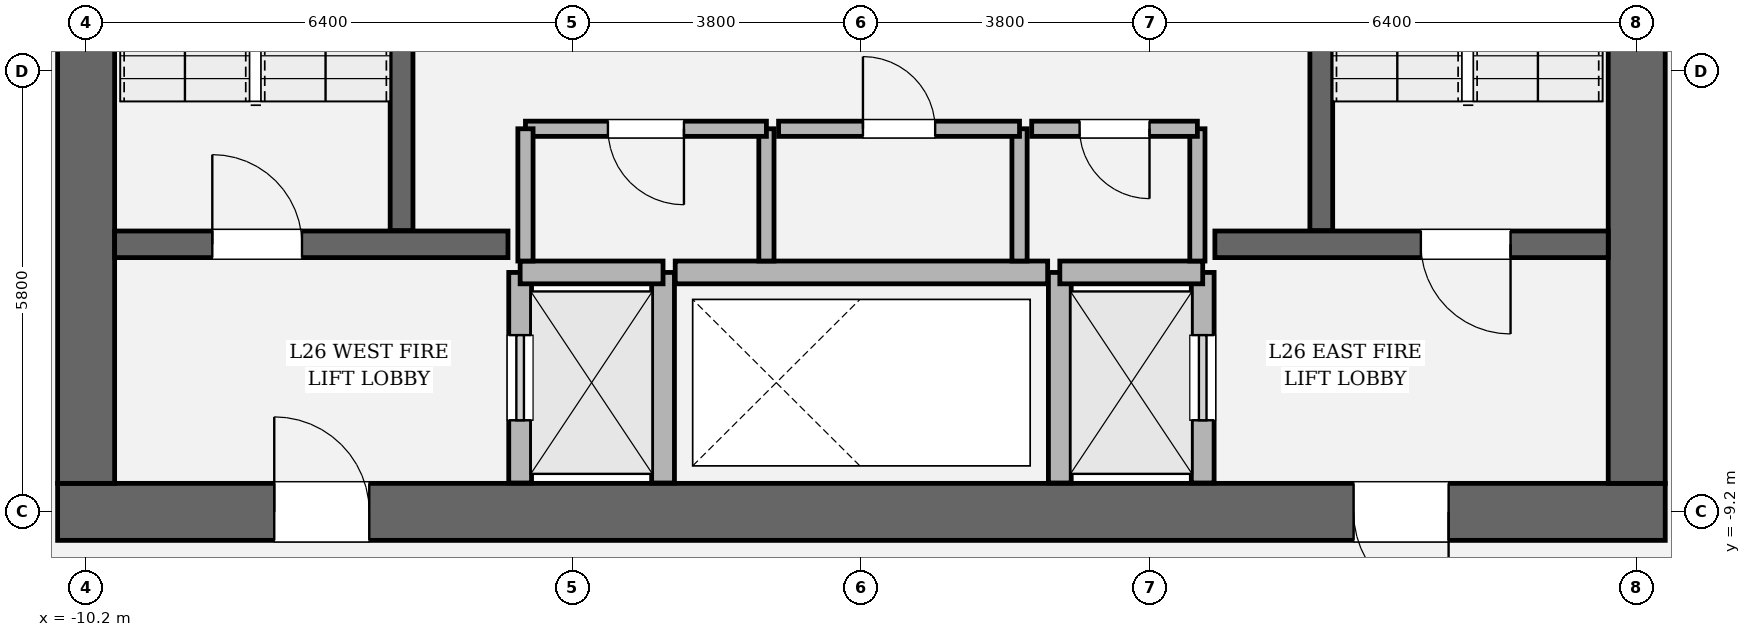
"""IFC4 building model, lengths in metres.
Left out: names, types, materials, properties, quantities, classifications, styles, units other than length and angle.
Written with IfcOpenShell. Run it as: python <this file> out.ifc"""

import sys

from ifc_helpers import new_model, si_unit, direction, frame, frame_2d, origin, place, context, subcontext, project, spatial, rectangle, extrude, element, fill, save


model = new_model("IFC4")
c1 = context("Model", 3, precision=1e-05, world=origin(), true_north=direction((0.0, 1.0)))
c2 = subcontext(c1, "Body", "Model", "MODEL_VIEW")
j1 = project(units=[si_unit("LENGTHUNIT", "METRE"), si_unit("PLANEANGLEUNIT", "RADIAN")], contexts=[c1])
p1 = place(None, origin())
s1 = spatial("IfcSite", under=j1, at=p1, CompositionType="ELEMENT")
p2 = place(p1, origin())
s2 = spatial("IfcBuilding", under=s1, at=p2, CompositionType="ELEMENT")
p3 = place(p2, frame((0.0, 0.0, 113.25)))
s3 = spatial("IfcBuildingStorey", under=s2, at=p3, CompositionType="ELEMENT", Elevation=113.25)
p4 = place(p3, frame((10.575, -9.2, 0.0), z_axis=(0.0, 0.0, 1.0), x_axis=(-1.0, 0.0, 0.0)))
e1 = element("IfcWall", 1, at=p4, inside=s3, PredefinedType="SHEAR", context=c2, shape_type="SweptSolid", body=[
    extrude(rectangle(XDim=21.15, YDim=0.75, at=frame_2d((10.575, 0.0))), origin(), (0.0, 0.0, 1.0), 4.05),
])
p5 = place(p4, frame((2.85, 0.0, 0.0)))
e2 = element("IfcOpeningElement", 2, at=p5, cuts=e1, PredefinedType="OPENING", context=c2, shape_type="SweptSolid", body=[
    extrude(rectangle(XDim=1.25, YDim=2.25, at=frame_2d((0.625, 1.125))), frame((0.0, 0.385, 0.0), z_axis=(0.0, -1.0, 0.0), x_axis=(1.0, 0.0, 0.0)), (0.0, 0.0, 1.0), 0.77),
])
p6 = place(p4, frame((17.05, 0.0, 0.0)))
e3 = element("IfcOpeningElement", 3, at=p6, cuts=e1, PredefinedType="OPENING", context=c2, shape_type="SweptSolid", body=[
    extrude(rectangle(XDim=1.25, YDim=2.25, at=frame_2d((0.625, 1.125))), frame((0.0, 0.385, 0.0), z_axis=(0.0, -1.0, 0.0), x_axis=(1.0, 0.0, 0.0)), (0.0, 0.0, 1.0), 0.77),
])
p7 = place(p3, frame((-10.2, -8.825, 0.0), z_axis=(0.0, 0.0, 1.0), x_axis=(0.0, 1.0, 0.0)))
e4 = element("IfcWall", 4, at=p7, inside=s3, PredefinedType="SHEAR", context=c2, shape_type="SweptSolid", body=[
    extrude(rectangle(XDim=17.65, YDim=0.75, at=frame_2d((8.825, 0.0))), origin(), (0.0, 0.0, 1.0), 4.05),
])
p8 = place(p7, frame((12.615, 0.0, 0.0)))
e5 = element("IfcOpeningElement", 5, at=p8, cuts=e4, PredefinedType="OPENING", context=c2, shape_type="SweptSolid", body=[
    extrude(rectangle(XDim=1.18, YDim=2.2, at=frame_2d((0.59, 1.1))), frame((0.0, 0.385, 0.0), z_axis=(0.0, -1.0, 0.0), x_axis=(1.0, 0.0, 0.0)), (0.0, 0.0, 1.0), 0.77),
])
p9 = place(p3, frame((10.2, 8.825, 0.0), z_axis=(0.0, 0.0, 1.0), x_axis=(0.0, -1.0, 0.0)))
e6 = element("IfcWall", 6, at=p9, inside=s3, PredefinedType="SHEAR", context=c2, shape_type="SweptSolid", body=[
    extrude(rectangle(XDim=17.65, YDim=0.75, at=frame_2d((8.825, 0.0))), origin(), (0.0, 0.0, 1.0), 4.05),
])
p10 = place(p9, frame((3.855, 0.0, 0.0)))
e7 = element("IfcOpeningElement", 7, at=p10, cuts=e6, PredefinedType="OPENING", context=c2, shape_type="SweptSolid", body=[
    extrude(rectangle(XDim=1.18, YDim=2.2, at=frame_2d((0.59, 1.1))), frame((0.0, 0.385, 0.0), z_axis=(0.0, -1.0, 0.0), x_axis=(1.0, 0.0, 0.0)), (0.0, 0.0, 1.0), 0.77),
])
for number, where, z_axis, x_axis in (
    (8, (-6.05, -5.5, 0.0), (0.0, 0.0, 1.0), (0.0, 1.0, 0.0)),
    (9, (6.05, 3.45, 0.0), (0.0, 0.0, 1.0), (0.0, -1.0, 0.0)),
):
    element("IfcWall", number, at=place(p3, frame(where, z_axis=z_axis, x_axis=x_axis)), inside=s3, PredefinedType="SOLIDWALL", context=c2, shape_type="SweptSolid", body=[
        extrude(rectangle(XDim=8.95, YDim=0.3, at=frame_2d((4.475, 0.0))), origin(), (0.0, 0.0, 1.0), 4.05),
    ])
p11 = place(p3, frame((-9.825, -5.68, 0.0), z_axis=(0.0, 0.0, 1.0), x_axis=(1.0, 0.0, 0.0)))
e10 = element("IfcWall", 10, at=p11, inside=s3, PredefinedType="SOLIDWALL", context=c2, shape_type="SweptSolid", body=[
    extrude(rectangle(XDim=5.175, YDim=0.35, at=frame_2d((2.587, 0.0))), origin(), (0.0, 0.0, 1.0), 4.05),
])
p12 = place(p11, frame((1.285, 0.0, 0.0)))
e11 = element("IfcOpeningElement", 11, at=p12, cuts=e10, PredefinedType="OPENING", context=c2, shape_type="SweptSolid", body=[
    extrude(rectangle(XDim=1.18, YDim=2.2, at=frame_2d((0.59, 1.1))), frame((0.0, 0.185, 0.0), z_axis=(0.0, -1.0, 0.0), x_axis=(1.0, 0.0, 0.0)), (0.0, 0.0, 1.0), 0.37),
])
p13 = place(p3, frame((4.65, -5.68, 0.0), z_axis=(0.0, 0.0, 1.0), x_axis=(1.0, 0.0, 0.0)))
e12 = element("IfcWall", 12, at=p13, inside=s3, PredefinedType="SOLIDWALL", context=c2, shape_type="SweptSolid", body=[
    extrude(rectangle(XDim=5.175, YDim=0.35, at=frame_2d((2.587, 0.0))), origin(), (0.0, 0.0, 1.0), 4.05),
])
p14 = place(p13, frame((2.71, 0.0, 0.0)))
e13 = element("IfcOpeningElement", 13, at=p14, cuts=e12, PredefinedType="OPENING", context=c2, shape_type="SweptSolid", body=[
    extrude(rectangle(XDim=1.18, YDim=2.2, at=frame_2d((0.59, 1.1))), frame((0.0, 0.185, 0.0), z_axis=(0.0, -1.0, 0.0), x_axis=(1.0, 0.0, 0.0)), (0.0, 0.0, 1.0), 0.37),
])
p15 = place(p3, frame((-4.49, -8.82, 0.0), z_axis=(0.0, 0.0, 1.0), x_axis=(0.0, 1.0, 0.0)))
e14 = element("IfcWall", 14, at=p15, inside=s3, PredefinedType="SOLIDWALL", context=c2, shape_type="SweptSolid", body=[
    extrude(rectangle(XDim=2.77, YDim=0.3, at=frame_2d((1.385, 0.0))), origin(), (0.0, 0.0, 1.0), 3.81),
])
p16 = place(p15, frame((0.825, 0.0, 0.0)))
e15 = element("IfcOpeningElement", 15, at=p16, cuts=e14, PredefinedType="OPENING", context=c2, shape_type="SweptSolid", body=[
    extrude(rectangle(XDim=1.12, YDim=2.25, at=frame_2d((0.56, 1.125))), frame((0.0, 0.16, 0.0), z_axis=(0.0, -1.0, 0.0), x_axis=(1.0, 0.0, 0.0)), (0.0, 0.0, 1.0), 0.32),
])
p17 = place(p3, frame((-2.61, -8.82, 0.0), z_axis=(0.0, 0.0, 1.0), x_axis=(0.0, 1.0, 0.0)))
e16 = element("IfcWall", 16, at=p17, inside=s3, PredefinedType="SOLIDWALL", context=c2, shape_type="SweptSolid", body=[
    extrude(rectangle(XDim=2.77, YDim=0.3, at=frame_2d((1.385, 0.0))), origin(), (0.0, 0.0, 1.0), 3.81),
])
p18 = place(p3, frame((-4.49, -6.05, 0.0), z_axis=(0.0, 0.0, 1.0), x_axis=(1.0, 0.0, 0.0)))
e17 = element("IfcWall", 17, at=p18, inside=s3, PredefinedType="SOLIDWALL", context=c2, shape_type="SweptSolid", body=[
    extrude(rectangle(XDim=1.88, YDim=0.3, at=frame_2d((0.94, 0.0))), origin(), (0.0, 0.0, 1.0), 3.81),
])
p19 = place(p3, frame((4.49, -8.82, 0.0), z_axis=(0.0, 0.0, 1.0), x_axis=(0.0, 1.0, 0.0)))
e18 = element("IfcWall", 18, at=p19, inside=s3, PredefinedType="SOLIDWALL", context=c2, shape_type="SweptSolid", body=[
    extrude(rectangle(XDim=2.77, YDim=0.3, at=frame_2d((1.385, 0.0))), origin(), (0.0, 0.0, 1.0), 3.81),
])
p20 = place(p19, frame((0.825, 0.0, 0.0)))
e19 = element("IfcOpeningElement", 19, at=p20, cuts=e18, PredefinedType="OPENING", context=c2, shape_type="SweptSolid", body=[
    extrude(rectangle(XDim=1.12, YDim=2.25, at=frame_2d((0.56, 1.125))), frame((0.0, 0.16, 0.0), z_axis=(0.0, -1.0, 0.0), x_axis=(1.0, 0.0, 0.0)), (0.0, 0.0, 1.0), 0.32),
])
p21 = place(p3, frame((2.61, -8.82, 0.0), z_axis=(0.0, 0.0, 1.0), x_axis=(0.0, 1.0, 0.0)))
e20 = element("IfcWall", 20, at=p21, inside=s3, PredefinedType="SOLIDWALL", context=c2, shape_type="SweptSolid", body=[
    extrude(rectangle(XDim=2.77, YDim=0.3, at=frame_2d((1.385, 0.0))), origin(), (0.0, 0.0, 1.0), 3.81),
])
p22 = place(p3, frame((2.61, -6.05, 0.0), z_axis=(0.0, 0.0, 1.0), x_axis=(1.0, 0.0, 0.0)))
e21 = element("IfcWall", 21, at=p22, inside=s3, PredefinedType="SOLIDWALL", context=c2, shape_type="SweptSolid", body=[
    extrude(rectangle(XDim=1.88, YDim=0.3, at=frame_2d((0.94, 0.0))), origin(), (0.0, 0.0, 1.0), 3.81),
])
p23 = place(p3, frame((-2.45, -6.05, 0.0), z_axis=(0.0, 0.0, 1.0), x_axis=(1.0, 0.0, 0.0)))
e22 = element("IfcWall", 22, at=p23, inside=s3, PredefinedType="SOLIDWALL", context=c2, shape_type="SweptSolid", body=[
    extrude(rectangle(XDim=4.9, YDim=0.3, at=frame_2d((2.45, 0.0))), origin(), (0.0, 0.0, 1.0), 3.81),
])
p24 = place(p3, frame((-1.25, -5.9, 0.0), z_axis=(0.0, 0.0, 1.0), x_axis=(0.0, 1.0, 0.0)))
e23 = element("IfcWall", 23, at=p24, inside=s3, PredefinedType="SOLIDWALL", context=c2, shape_type="SweptSolid", body=[
    extrude(rectangle(XDim=1.74, YDim=0.2, at=frame_2d((0.87, 0.0))), origin(), (0.0, 0.0, 1.0), 3.81),
])
p25 = place(p3, frame((-1.25, -4.16, 0.0), z_axis=(0.0, 0.0, 1.0), x_axis=(-1.0, 0.0, 0.0)))
e24 = element("IfcWall", 24, at=p25, inside=s3, PredefinedType="SOLIDWALL", context=c2, shape_type="SweptSolid", body=[
    extrude(rectangle(XDim=3.17, YDim=0.2, at=frame_2d((1.585, 0.0))), origin(), (0.0, 0.0, 1.0), 3.81),
])
p26 = place(p25, frame((1.085, 0.0, 0.0)))
e25 = element("IfcOpeningElement", 25, at=p26, cuts=e24, PredefinedType="OPENING", context=c2, shape_type="SweptSolid", body=[
    extrude(rectangle(XDim=1.0, YDim=2.15, at=frame_2d((0.5, 1.075))), frame((0.0, 0.11, 0.0), z_axis=(0.0, -1.0, 0.0), x_axis=(1.0, 0.0, 0.0)), (0.0, 0.0, 1.0), 0.22),
])
for number, where, z_axis, x_axis in (
    (26, (-4.42, -4.16, 0.0), (0.0, 0.0, 1.0), (0.0, -1.0, 0.0)),
    (27, (2.08, -5.9, 0.0), (0.0, 0.0, 1.0), (0.0, 1.0, 0.0)),
):
    element("IfcWall", number, at=place(p3, frame(where, z_axis=z_axis, x_axis=x_axis)), inside=s3, PredefinedType="SOLIDWALL", context=c2, shape_type="SweptSolid", body=[
        extrude(rectangle(XDim=1.74, YDim=0.2, at=frame_2d((0.87, 0.0))), origin(), (0.0, 0.0, 1.0), 3.81),
    ])
p27 = place(p3, frame((2.08, -4.16, 0.0), z_axis=(0.0, 0.0, 1.0), x_axis=(-1.0, 0.0, 0.0)))
e28 = element("IfcWall", 28, at=p27, inside=s3, PredefinedType="SOLIDWALL", context=c2, shape_type="SweptSolid", body=[
    extrude(rectangle(XDim=3.17, YDim=0.2, at=frame_2d((1.585, 0.0))), origin(), (0.0, 0.0, 1.0), 3.81),
])
p28 = place(p27, frame((1.11, 0.0, 0.0)))
e29 = element("IfcOpeningElement", 29, at=p28, cuts=e28, PredefinedType="OPENING", context=c2, shape_type="SweptSolid", body=[
    extrude(rectangle(XDim=0.95, YDim=2.15, at=frame_2d((0.475, 1.075))), frame((0.0, 0.11, 0.0), z_axis=(0.0, -1.0, 0.0), x_axis=(1.0, 0.0, 0.0)), (0.0, 0.0, 1.0), 0.22),
])
p29 = place(p3, frame((4.42, -5.9, 0.0), z_axis=(0.0, 0.0, 1.0), x_axis=(0.0, 1.0, 0.0)))
e30 = element("IfcWall", 30, at=p29, inside=s3, PredefinedType="SOLIDWALL", context=c2, shape_type="SweptSolid", body=[
    extrude(rectangle(XDim=1.74, YDim=0.2, at=frame_2d((0.87, 0.0))), origin(), (0.0, 0.0, 1.0), 3.81),
])
p30 = place(p3, frame((4.42, -4.16, 0.0), z_axis=(0.0, 0.0, 1.0), x_axis=(-1.0, 0.0, 0.0)))
e31 = element("IfcWall", 31, at=p30, inside=s3, PredefinedType="SOLIDWALL", context=c2, shape_type="SweptSolid", body=[
    extrude(rectangle(XDim=2.18, YDim=0.2, at=frame_2d((1.09, 0.0))), origin(), (0.0, 0.0, 1.0), 3.81),
])
p31 = place(p30, frame((0.63, 0.0, 0.0)))
e32 = element("IfcOpeningElement", 32, at=p31, cuts=e31, PredefinedType="OPENING", context=c2, shape_type="SweptSolid", body=[
    extrude(rectangle(XDim=0.92, YDim=2.1, at=frame_2d((0.46, 1.05))), frame((0.0, 0.11, 0.0), z_axis=(0.0, -1.0, 0.0), x_axis=(1.0, 0.0, 0.0)), (0.0, 0.0, 1.0), 0.22),
])
p32 = place(p12, origin())
e33 = element("IfcDoor", 33, at=p32, inside=s3, OperationType="SINGLE_SWING_LEFT", PredefinedType="DOOR", context=c2, shape_type="SweptSolid", body=[
    extrude(rectangle(XDim=1.18, YDim=2.2, at=frame_2d((0.59, 1.1))), frame((0.0, 0.025, 0.0), z_axis=(0.0, -1.0, 0.0), x_axis=(1.0, 0.0, 0.0)), (0.0, 0.0, 1.0), 0.05),
])
fill(e11, e33)
p33 = place(p14, origin())
e34 = element("IfcDoor", 34, at=p33, inside=s3, OperationType="SINGLE_SWING_RIGHT", PredefinedType="DOOR", context=c2, shape_type="SweptSolid", body=[
    extrude(rectangle(XDim=1.18, YDim=2.2, at=frame_2d((0.59, 1.1))), frame((0.0, 0.025, 0.0), z_axis=(0.0, -1.0, 0.0), x_axis=(1.0, 0.0, 0.0)), (0.0, 0.0, 1.0), 0.05),
])
fill(e13, e34)
p34 = place(p5, origin())
e35 = element("IfcDoor", 35, at=p34, inside=s3, OperationType="SINGLE_SWING_LEFT", PredefinedType="DOOR", context=c2, shape_type="SweptSolid", body=[
    extrude(rectangle(XDim=1.25, YDim=2.25, at=frame_2d((0.625, 1.125))), frame((0.0, 0.025, 0.0), z_axis=(0.0, -1.0, 0.0), x_axis=(1.0, 0.0, 0.0)), (0.0, 0.0, 1.0), 0.05),
])
fill(e2, e35)
p35 = place(p6, origin())
e36 = element("IfcDoor", 36, at=p35, inside=s3, OperationType="SINGLE_SWING_RIGHT", PredefinedType="DOOR", context=c2, shape_type="SweptSolid", body=[
    extrude(rectangle(XDim=1.25, YDim=2.25, at=frame_2d((0.625, 1.125))), frame((0.0, 0.025, 0.0), z_axis=(0.0, -1.0, 0.0), x_axis=(1.0, 0.0, 0.0)), (0.0, 0.0, 1.0), 0.05),
])
fill(e3, e36)
p36 = place(p16, origin())
e37 = element("IfcDoor", 37, at=p36, inside=s3, OperationType="SLIDING_TO_LEFT", PredefinedType="DOOR", context=c2, shape_type="SweptSolid", body=[
    extrude(rectangle(XDim=1.12, YDim=2.25, at=frame_2d((0.56, 1.125))), frame((0.0, 0.025, 0.0), z_axis=(0.0, -1.0, 0.0), x_axis=(1.0, 0.0, 0.0)), (0.0, 0.0, 1.0), 0.05),
])
fill(e15, e37)
p37 = place(p20, origin())
e38 = element("IfcDoor", 38, at=p37, inside=s3, OperationType="SLIDING_TO_RIGHT", PredefinedType="DOOR", context=c2, shape_type="SweptSolid", body=[
    extrude(rectangle(XDim=1.12, YDim=2.25, at=frame_2d((0.56, 1.125))), frame((0.0, 0.025, 0.0), z_axis=(0.0, -1.0, 0.0), x_axis=(1.0, 0.0, 0.0)), (0.0, 0.0, 1.0), 0.05),
])
fill(e19, e38)
p38 = place(p26, origin())
e39 = element("IfcDoor", 39, at=p38, inside=s3, OperationType="SINGLE_SWING_LEFT", PredefinedType="DOOR", context=c2, shape_type="SweptSolid", body=[
    extrude(rectangle(XDim=1.0, YDim=2.15, at=frame_2d((0.5, 1.075))), frame((0.0, 0.025, 0.0), z_axis=(0.0, -1.0, 0.0), x_axis=(1.0, 0.0, 0.0)), (0.0, 0.0, 1.0), 0.05),
])
fill(e25, e39)
p39 = place(p28, origin())
e40 = element("IfcDoor", 40, at=p39, inside=s3, OperationType="SINGLE_SWING_RIGHT", PredefinedType="DOOR", context=c2, shape_type="SweptSolid", body=[
    extrude(rectangle(XDim=0.95, YDim=2.15, at=frame_2d((0.475, 1.075))), frame((0.0, 0.025, 0.0), z_axis=(0.0, -1.0, 0.0), x_axis=(1.0, 0.0, 0.0)), (0.0, 0.0, 1.0), 0.05),
])
fill(e29, e40)
p40 = place(p31, origin())
e41 = element("IfcDoor", 41, at=p40, inside=s3, OperationType="SINGLE_SWING_LEFT", PredefinedType="DOOR", context=c2, shape_type="SweptSolid", body=[
    extrude(rectangle(XDim=0.92, YDim=2.1, at=frame_2d((0.46, 1.05))), frame((0.0, 0.025, 0.0), z_axis=(0.0, -1.0, 0.0), x_axis=(1.0, 0.0, 0.0)), (0.0, 0.0, 1.0), 0.05),
])
fill(e32, e41)
save(model, sys.argv[1])
